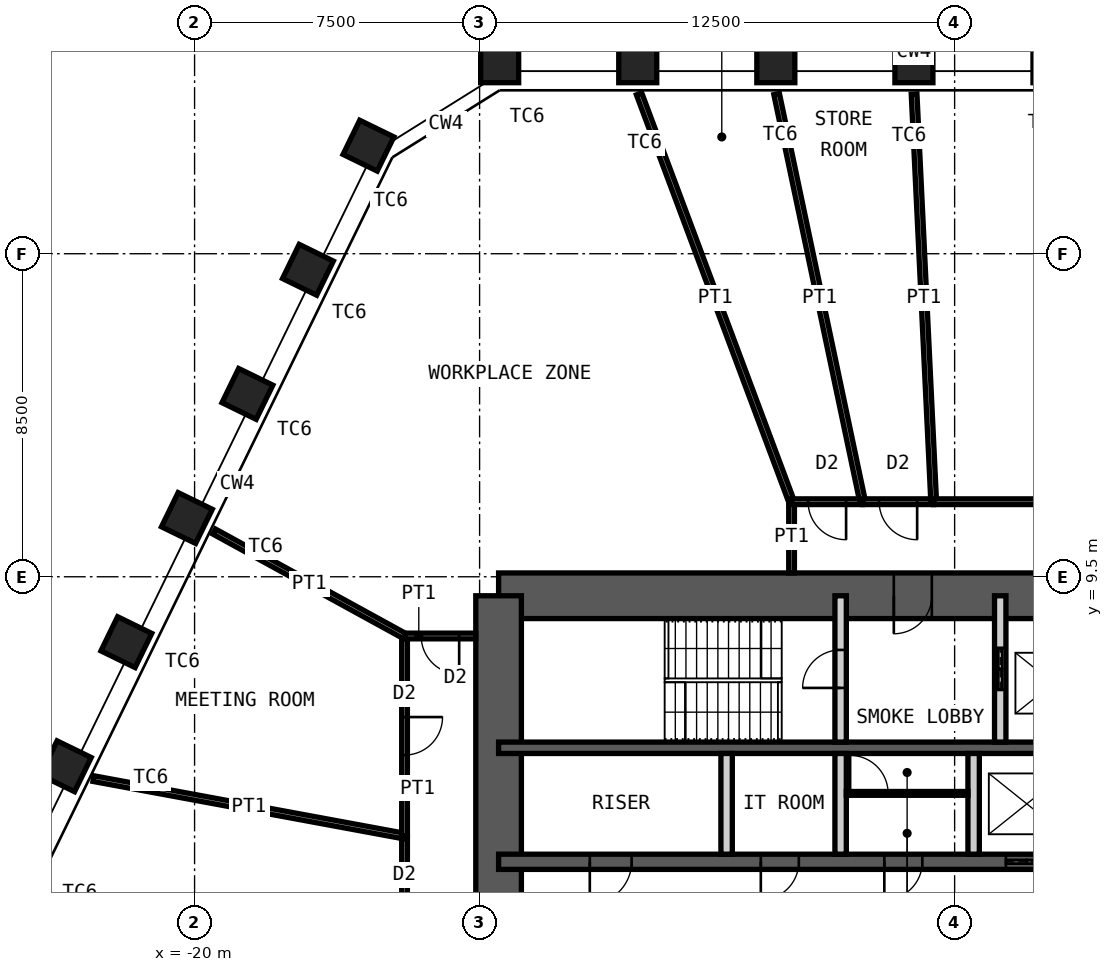
"""IFC4 building model, lengths in metres.
Left out: names, types, materials, properties, quantities, classifications, styles, units other than length and angle.
Written with IfcOpenShell. Run it as: python <this file> out.ifc"""

import sys

from ifc_helpers import new_model, si_unit, direction, frame, frame_2d, origin, origin_2d, place, context, subcontext, project, spatial, rectangle, hollow_rectangle, extrude, element, fill, save


model = new_model("IFC4")
c1 = context("Model", 3, precision=1e-05, world=origin(), true_north=direction((0.0, 1.0)))
c2 = subcontext(c1, "Body", "Model", "MODEL_VIEW")
j1 = project(units=[si_unit("LENGTHUNIT", "METRE"), si_unit("PLANEANGLEUNIT", "RADIAN")], contexts=[c1])
p1 = place(None, origin())
s1 = spatial("IfcSite", under=j1, at=p1, CompositionType="ELEMENT")
p2 = place(p1, origin())
s2 = spatial("IfcBuilding", under=s1, at=p2, CompositionType="ELEMENT")
p3 = place(p2, frame((0.0, 0.0, 243.4)))
s3 = spatial("IfcBuildingStorey", under=s2, at=p3, CompositionType="ELEMENT", Elevation=243.4)
for number, where, z_axis, x_axis in (
    (1, (-11.972, 23.0, 0.0), (0.0, 0.0, 1.0), (-1.0, 0.0, 0.0)),
    (2, (-8.338, 23.0, 0.0), (0.0, 0.0, 1.0), (-1.0, 0.0, 0.0)),
    (3, (-4.705, 23.0, 0.0), (0.0, 0.0, 1.0), (-1.0, 0.0, 0.0)),
    (4, (-1.071, 23.0, 0.0), (0.0, 0.0, 1.0), (-1.0, 0.0, 0.0)),
    (5, (-23.388, 4.514, 0.0), (0.0, 0.0, 1.0), (-0.438, -0.899, 0.0)),
    (6, (-21.795, 7.78, 0.0), (0.0, 0.0, 1.0), (-0.438, -0.899, 0.0)),
    (7, (-20.203, 11.045, 0.0), (0.0, 0.0, 1.0), (-0.438, -0.899, 0.0)),
    (8, (-18.61, 14.311, 0.0), (0.0, 0.0, 1.0), (-0.438, -0.899, 0.0)),
    (9, (-17.017, 17.577, 0.0), (0.0, 0.0, 1.0), (-0.438, -0.899, 0.0)),
    (10, (-15.424, 20.843, 0.0), (0.0, 0.0, 1.0), (-0.438, -0.899, 0.0)),
):
    element("IfcColumn", number, at=place(p3, frame(where, z_axis=z_axis, x_axis=x_axis)), inside=s3, PredefinedType="COLUMN", context=c2, shape_type="SweptSolid", body=[
        extrude(hollow_rectangle(XDim=1.0, YDim=1.0, WallThickness=0.06, at=origin_2d()), origin(), (0.0, 0.0, 1.0), 4.2),
    ])
p4 = place(p3, frame((-12.0, 9.0, 0.0), z_axis=(0.0, 0.0, 1.0), x_axis=(1.0, 0.0, 0.0)))
e11 = element("IfcWall", 11, at=p4, inside=s3, PredefinedType="SHEAR", context=c2, shape_type="SweptSolid", body=[
    extrude(rectangle(XDim=24.0, YDim=1.2, at=frame_2d((12.0, 0.0))), origin(), (0.0, 0.0, 1.0), 4.2),
])
p5 = place(p4, frame((10.4, 0.0, 0.0)))
e12 = element("IfcOpeningElement", 12, at=p5, cuts=e11, PredefinedType="OPENING", context=c2, shape_type="SweptSolid", body=[
    extrude(rectangle(XDim=1.0, YDim=2.1, at=frame_2d((0.5, 1.05))), frame((0.0, 0.61, 0.0), z_axis=(0.0, -1.0, 0.0), x_axis=(1.0, 0.0, 0.0)), (0.0, 0.0, 1.0), 1.22),
])
p6 = place(p4, frame((17.6, 0.0, 0.0)))
e13 = element("IfcOpeningElement", 13, at=p6, cuts=e11, PredefinedType="OPENING", context=c2, shape_type="SweptSolid", body=[
    extrude(rectangle(XDim=0.9, YDim=2.1, at=frame_2d((0.45, 1.05))), frame((0.0, 0.61, 0.0), z_axis=(0.0, -1.0, 0.0), x_axis=(1.0, 0.0, 0.0)), (0.0, 0.0, 1.0), 1.22),
])
p7 = place(p4, frame((21.9, 0.0, 0.0)))
e14 = element("IfcOpeningElement", 14, at=p7, cuts=e11, PredefinedType="OPENING", context=c2, shape_type="SweptSolid", body=[
    extrude(rectangle(XDim=0.9, YDim=2.1, at=frame_2d((0.45, 1.05))), frame((0.0, 0.61, 0.0), z_axis=(0.0, -1.0, 0.0), x_axis=(1.0, 0.0, 0.0)), (0.0, 0.0, 1.0), 1.22),
])
p8 = place(p3, frame((-12.0, -9.0, 0.0), z_axis=(0.0, 0.0, 1.0), x_axis=(0.0, 1.0, 0.0)))
e15 = element("IfcWall", 15, at=p8, inside=s3, PredefinedType="SHEAR", context=c2, shape_type="SweptSolid", body=[
    extrude(rectangle(XDim=18.0, YDim=1.2, at=frame_2d((9.0, 0.0))), origin(), (0.0, 0.0, 1.0), 4.2),
])
p9 = place(p8, frame((8.1, 0.0, 0.0)))
e16 = element("IfcOpeningElement", 16, at=p9, cuts=e15, PredefinedType="OPENING", context=c2, shape_type="SweptSolid", body=[
    extrude(rectangle(XDim=1.8, YDim=2.1, at=frame_2d((0.9, 1.05))), frame((0.0, 0.61, 0.0), z_axis=(0.0, -1.0, 0.0), x_axis=(1.0, 0.0, 0.0)), (0.0, 0.0, 1.0), 1.22),
])
p10 = place(p3, frame((-12.0, 5.0, 0.0), z_axis=(0.0, 0.0, 1.0), x_axis=(1.0, 0.0, 0.0)))
e17 = element("IfcWall", 17, at=p10, inside=s3, PredefinedType="SHEAR", context=c2, shape_type="SweptSolid", body=[
    extrude(rectangle(XDim=24.0, YDim=0.3, at=frame_2d((12.0, 0.0))), origin(), (0.0, 0.0, 1.0), 4.2),
])
p11 = place(p3, frame((-12.0, 2.0, 0.0), z_axis=(0.0, 0.0, 1.0), x_axis=(1.0, 0.0, 0.0)))
e18 = element("IfcWall", 18, at=p11, inside=s3, PredefinedType="SHEAR", context=c2, shape_type="SweptSolid", body=[
    extrude(rectangle(XDim=24.0, YDim=0.4, at=frame_2d((12.0, 0.0))), origin(), (0.0, 0.0, 1.0), 4.2),
])
p12 = place(p11, frame((2.4, 0.0, 0.0)))
e19 = element("IfcOpeningElement", 19, at=p12, cuts=e18, PredefinedType="OPENING", context=c2, shape_type="SweptSolid", body=[
    extrude(rectangle(XDim=1.1, YDim=2.1, at=frame_2d((0.55, 1.05))), frame((0.0, 0.21, 0.0), z_axis=(0.0, -1.0, 0.0), x_axis=(1.0, 0.0, 0.0)), (0.0, 0.0, 1.0), 0.42),
])
p13 = place(p11, frame((22.0, 0.0, 0.0)))
e20 = element("IfcOpeningElement", 20, at=p13, cuts=e18, PredefinedType="OPENING", context=c2, shape_type="SweptSolid", body=[
    extrude(rectangle(XDim=1.1, YDim=2.1, at=frame_2d((0.55, 1.05))), frame((0.0, 0.21, 0.0), z_axis=(0.0, -1.0, 0.0), x_axis=(1.0, 0.0, 0.0)), (0.0, 0.0, 1.0), 0.42),
])
p14 = place(p11, frame((10.15, 0.0, 0.0)))
e21 = element("IfcOpeningElement", 21, at=p14, cuts=e18, PredefinedType="OPENING", context=c2, shape_type="SweptSolid", body=[
    extrude(rectangle(XDim=1.0, YDim=2.1, at=frame_2d((0.5, 1.05))), frame((0.0, 0.21, 0.0), z_axis=(0.0, -1.0, 0.0), x_axis=(1.0, 0.0, 0.0)), (0.0, 0.0, 1.0), 0.42),
])
p15 = place(p11, frame((6.9, 0.0, 0.0)))
e22 = element("IfcOpeningElement", 22, at=p15, cuts=e18, PredefinedType="OPENING", context=c2, shape_type="SweptSolid", body=[
    extrude(rectangle(XDim=1.0, YDim=2.1, at=frame_2d((0.5, 1.05))), frame((0.0, 0.21, 0.0), z_axis=(0.0, -1.0, 0.0), x_axis=(1.0, 0.0, 0.0)), (0.0, 0.0, 1.0), 0.42),
])
p16 = place(p11, frame((13.35, 0.0, 0.0)))
e23 = element("IfcOpeningElement", 23, at=p16, cuts=e18, PredefinedType="OPENING", context=c2, shape_type="SweptSolid", body=[
    extrude(rectangle(XDim=1.1, YDim=2.4, at=frame_2d((0.55, 1.2))), frame((0.0, 0.21, 0.0), z_axis=(0.0, -1.0, 0.0), x_axis=(1.0, 0.0, 0.0)), (0.0, 0.0, 1.0), 0.42),
])
p17 = place(p11, frame((16.15, 0.0, 0.0)))
e24 = element("IfcOpeningElement", 24, at=p17, cuts=e18, PredefinedType="OPENING", context=c2, shape_type="SweptSolid", body=[
    extrude(rectangle(XDim=1.1, YDim=2.4, at=frame_2d((0.55, 1.2))), frame((0.0, 0.21, 0.0), z_axis=(0.0, -1.0, 0.0), x_axis=(1.0, 0.0, 0.0)), (0.0, 0.0, 1.0), 0.42),
])
p18 = place(p11, frame((18.95, 0.0, 0.0)))
e25 = element("IfcOpeningElement", 25, at=p18, cuts=e18, PredefinedType="OPENING", context=c2, shape_type="SweptSolid", body=[
    extrude(rectangle(XDim=1.1, YDim=2.4, at=frame_2d((0.55, 1.2))), frame((0.0, 0.21, 0.0), z_axis=(0.0, -1.0, 0.0), x_axis=(1.0, 0.0, 0.0)), (0.0, 0.0, 1.0), 0.42),
])
p19 = place(p3, frame((-3.0, 5.15, 0.0), z_axis=(0.0, 0.0, 1.0), x_axis=(0.0, 1.0, 0.0)))
e26 = element("IfcWall", 26, at=p19, inside=s3, PredefinedType="PARTITIONING", context=c2, shape_type="SweptSolid", body=[
    extrude(rectangle(XDim=3.85, YDim=0.3, at=frame_2d((1.925, 0.0))), origin(), (0.0, 0.0, 1.0), 3.98),
])
p20 = place(p19, frame((1.425, 0.0, 0.0)))
e27 = element("IfcOpeningElement", 27, at=p20, cuts=e26, PredefinedType="OPENING", context=c2, shape_type="SweptSolid", body=[
    extrude(rectangle(XDim=1.0, YDim=2.1, at=frame_2d((0.5, 1.05))), frame((0.0, 0.16, 0.0), z_axis=(0.0, -1.0, 0.0), x_axis=(1.0, 0.0, 0.0)), (0.0, 0.0, 1.0), 0.32),
])
p21 = place(p3, frame((1.2, 5.15, 0.0), z_axis=(0.0, 0.0, 1.0), x_axis=(0.0, 1.0, 0.0)))
e28 = element("IfcWall", 28, at=p21, inside=s3, PredefinedType="PARTITIONING", context=c2, shape_type="SweptSolid", body=[
    extrude(rectangle(XDim=3.85, YDim=0.3, at=frame_2d((1.925, 0.0))), origin(), (0.0, 0.0, 1.0), 3.98),
])
p22 = place(p21, frame((1.375, 0.0, 0.0)))
e29 = element("IfcOpeningElement", 29, at=p22, cuts=e28, PredefinedType="OPENING", context=c2, shape_type="SweptSolid", body=[
    extrude(rectangle(XDim=1.1, YDim=2.4, at=frame_2d((0.55, 1.2))), frame((0.0, 0.16, 0.0), z_axis=(0.0, -1.0, 0.0), x_axis=(1.0, 0.0, 0.0)), (0.0, 0.0, 1.0), 0.32),
])
for number, where, z_axis, x_axis in (
    (30, (-6.0, 2.2, 0.0), (0.0, 0.0, 1.0), (0.0, 1.0, 0.0)),
    (31, (-3.0, 2.2, 0.0), (0.0, 0.0, 1.0), (0.0, 1.0, 0.0)),
    (32, (0.5, 2.2, 0.0), (0.0, 0.0, 1.0), (0.0, 1.0, 0.0)),
):
    element("IfcWall", number, at=place(p3, frame(where, z_axis=z_axis, x_axis=x_axis)), inside=s3, PredefinedType="PARTITIONING", context=c2, shape_type="SweptSolid", body=[
        extrude(rectangle(XDim=2.65, YDim=0.3, at=frame_2d((1.325, 0.0))), origin(), (0.0, 0.0, 1.0), 3.98),
    ])
p23 = place(p3, frame((-2.85, 3.8, 0.0), z_axis=(0.0, 0.0, 1.0), x_axis=(1.0, 0.0, 0.0)))
e33 = element("IfcWall", 33, at=p23, inside=s3, PredefinedType="PARTITIONING", context=c2, shape_type="SweptSolid", body=[
    extrude(rectangle(XDim=3.2, YDim=0.1, at=frame_2d((1.6, 0.0))), origin(), (0.0, 0.0, 1.0), 3.98),
])
p24 = place(p23, frame((0.1, 0.0, 0.0)))
e34 = element("IfcOpeningElement", 34, at=p24, cuts=e33, PredefinedType="OPENING", context=c2, shape_type="SweptSolid", body=[
    extrude(rectangle(XDim=1.0, YDim=2.4, at=frame_2d((0.5, 1.2))), frame((0.0, 0.06, 0.0), z_axis=(0.0, -1.0, 0.0), x_axis=(1.0, 0.0, 0.0)), (0.0, 0.0, 1.0), 0.12),
])
p25 = place(p3, frame((-14.475, -1.576, 0.0), z_axis=(0.0, 0.0, 1.0), x_axis=(0.0, 1.0, 0.0)))
e35 = element("IfcWall", 35, at=p25, inside=s3, PredefinedType="PARTITIONING", context=c2, shape_type="SweptSolid", body=[
    extrude(rectangle(XDim=4.252, YDim=0.15, at=frame_2d((2.126, 0.0))), origin(), (0.0, 0.0, 1.0), 4.03),
])
p26 = place(p25, frame((1.626, 0.0, 0.0)))
e36 = element("IfcOpeningElement", 36, at=p26, cuts=e35, PredefinedType="OPENING", context=c2, shape_type="SweptSolid", body=[
    extrude(rectangle(XDim=1.0, YDim=2.4, at=frame_2d((0.5, 1.2))), frame((0.0, 0.085, 0.0), z_axis=(0.0, -1.0, 0.0), x_axis=(1.0, 0.0, 0.0)), (0.0, 0.0, 1.0), 0.17),
])
p27 = place(p3, frame((-22.661, 4.189, 0.0), z_axis=(0.0, 0.0, 1.0), x_axis=(0.983345347199, -0.181746879316, 0.0)))
e37 = element("IfcWall", 37, at=p27, inside=s3, PredefinedType="PARTITIONING", context=c2, shape_type="SweptSolid", body=[
    extrude(rectangle(XDim=8.324, YDim=0.15, at=frame_2d((4.162, 0.0))), origin(), (0.0, 0.0, 1.0), 3.43),
])
p28 = place(p3, frame((-14.475, 2.676, 0.0), z_axis=(0.0, 0.0, 1.0), x_axis=(0.0, 1.0, 0.0)))
e38 = element("IfcWall", 38, at=p28, inside=s3, PredefinedType="PARTITIONING", context=c2, shape_type="SweptSolid", body=[
    extrude(rectangle(XDim=5.266, YDim=0.15, at=frame_2d((2.633, 0.0))), origin(), (0.0, 0.0, 1.0), 4.03),
])
p29 = place(p28, frame((2.133, 0.0, 0.0)))
e39 = element("IfcOpeningElement", 39, at=p29, cuts=e38, PredefinedType="OPENING", context=c2, shape_type="SweptSolid", body=[
    extrude(rectangle(XDim=1.0, YDim=2.4, at=frame_2d((0.5, 1.2))), frame((0.0, 0.085, 0.0), z_axis=(0.0, -1.0, 0.0), x_axis=(1.0, 0.0, 0.0)), (0.0, 0.0, 1.0), 0.17),
])
p30 = place(p3, frame((-19.486, 10.69, 0.0), z_axis=(0.0, 0.0, 1.0), x_axis=(0.876724089264, -0.480993629172, 0.0)))
e40 = element("IfcWall", 40, at=p30, inside=s3, PredefinedType="PARTITIONING", context=c2, shape_type="SweptSolid", body=[
    extrude(rectangle(XDim=5.715, YDim=0.15, at=frame_2d((2.858, 0.0))), origin(), (0.0, 0.0, 1.0), 3.43),
])
p31 = place(p3, frame((-14.475, 7.941, 0.0), z_axis=(0.0, 0.0, 1.0), x_axis=(1.0, 0.0, 0.0)))
e41 = element("IfcWall", 41, at=p31, inside=s3, PredefinedType="PARTITIONING", context=c2, shape_type="SweptSolid", body=[
    extrude(rectangle(XDim=1.875, YDim=0.15, at=frame_2d((0.938, 0.0))), origin(), (0.0, 0.0, 1.0), 4.03),
])
p32 = place(p31, frame((0.438, 0.0, 0.0)))
e42 = element("IfcOpeningElement", 42, at=p32, cuts=e41, PredefinedType="OPENING", context=c2, shape_type="SweptSolid", body=[
    extrude(rectangle(XDim=1.0, YDim=2.4, at=frame_2d((0.5, 1.2))), frame((0.0, 0.085, 0.0), z_axis=(0.0, -1.0, 0.0), x_axis=(1.0, 0.0, 0.0)), (0.0, 0.0, 1.0), 0.17),
])
p33 = place(p3, frame((-4.291, 9.6, 0.0), z_axis=(0.0, 0.0, 1.0), x_axis=(0.0, 1.0, 0.0)))
e43 = element("IfcWall", 43, at=p33, inside=s3, PredefinedType="PARTITIONING", context=c2, shape_type="SweptSolid", body=[
    extrude(rectangle(XDim=1.875, YDim=0.15, at=frame_2d((0.938, 0.0))), origin(), (0.0, 0.0, 1.0), 4.03),
])
p34 = place(p3, frame((-8.303, 22.206, 0.0), z_axis=(0.0, 0.0, 1.0), x_axis=(0.350242883069, -0.936658914899, 0.0)))
e44 = element("IfcWall", 44, at=p34, inside=s3, PredefinedType="PARTITIONING", context=c2, shape_type="SweptSolid", body=[
    extrude(rectangle(XDim=11.457, YDim=0.15, at=frame_2d((5.729, 0.0))), origin(), (0.0, 0.0, 1.0), 3.43),
])
p35 = place(p3, frame((-4.291, 11.475, 0.0), z_axis=(0.0, 0.0, 1.0), x_axis=(1.0, 0.0, 0.0)))
e45 = element("IfcWall", 45, at=p35, inside=s3, PredefinedType="PARTITIONING", context=c2, shape_type="SweptSolid", body=[
    extrude(rectangle(XDim=1.87, YDim=0.15, at=frame_2d((0.935, 0.0))), origin(), (0.0, 0.0, 1.0), 4.03),
])
p36 = place(p35, frame((0.435, 0.0, 0.0)))
e46 = element("IfcOpeningElement", 46, at=p36, cuts=e45, PredefinedType="OPENING", context=c2, shape_type="SweptSolid", body=[
    extrude(rectangle(XDim=1.0, YDim=2.4, at=frame_2d((0.5, 1.2))), frame((0.0, 0.085, 0.0), z_axis=(0.0, -1.0, 0.0), x_axis=(1.0, 0.0, 0.0)), (0.0, 0.0, 1.0), 0.17),
])
p37 = place(p3, frame((-4.684, 22.202, 0.0), z_axis=(0.0, 0.0, 1.0), x_axis=(0.206456017157, -0.978455881979, 0.0)))
e47 = element("IfcWall", 47, at=p37, inside=s3, PredefinedType="PARTITIONING", context=c2, shape_type="SweptSolid", body=[
    extrude(rectangle(XDim=10.963, YDim=0.15, at=frame_2d((5.481, 0.0))), origin(), (0.0, 0.0, 1.0), 3.43),
])
p38 = place(p3, frame((-2.421, 11.475, 0.0), z_axis=(0.0, 0.0, 1.0), x_axis=(1.0, 0.0, 0.0)))
e48 = element("IfcWall", 48, at=p38, inside=s3, PredefinedType="PARTITIONING", context=c2, shape_type="SweptSolid", body=[
    extrude(rectangle(XDim=1.87, YDim=0.15, at=frame_2d((0.935, 0.0))), origin(), (0.0, 0.0, 1.0), 4.03),
])
p39 = place(p38, frame((0.435, 0.0, 0.0)))
e49 = element("IfcOpeningElement", 49, at=p39, cuts=e48, PredefinedType="OPENING", context=c2, shape_type="SweptSolid", body=[
    extrude(rectangle(XDim=1.0, YDim=2.4, at=frame_2d((0.5, 1.2))), frame((0.0, 0.085, 0.0), z_axis=(0.0, -1.0, 0.0), x_axis=(1.0, 0.0, 0.0)), (0.0, 0.0, 1.0), 0.17),
])
p40 = place(p3, frame((-1.067, 22.2, 0.0), z_axis=(0.0, 0.0, 1.0), x_axis=(0.047998335863, -0.998847415652, 0.0)))
e50 = element("IfcWall", 50, at=p40, inside=s3, PredefinedType="PARTITIONING", context=c2, shape_type="SweptSolid", body=[
    extrude(rectangle(XDim=10.738, YDim=0.15, at=frame_2d((5.369, 0.0))), origin(), (0.0, 0.0, 1.0), 3.43),
])
p41 = place(p3, frame((-0.551, 11.475, 0.0), z_axis=(0.0, 0.0, 1.0), x_axis=(1.0, 0.0, 0.0)))
e51 = element("IfcWall", 51, at=p41, inside=s3, PredefinedType="PARTITIONING", context=c2, shape_type="SweptSolid", body=[
    extrude(rectangle(XDim=10.342, YDim=0.15, at=frame_2d((5.171, 0.0))), origin(), (0.0, 0.0, 1.0), 4.03),
])
p42 = place(p41, frame((4.271, 0.0, 0.0)))
e52 = element("IfcOpeningElement", 52, at=p42, cuts=e51, PredefinedType="OPENING", context=c2, shape_type="SweptSolid", body=[
    extrude(rectangle(XDim=1.8, YDim=2.4, at=frame_2d((0.9, 1.2))), frame((0.0, 0.085, 0.0), z_axis=(0.0, -1.0, 0.0), x_axis=(1.0, 0.0, 0.0)), (0.0, 0.0, 1.0), 0.17),
])
p43 = place(p5, origin())
e53 = element("IfcDoor", 53, at=p43, inside=s3, OperationType="SINGLE_SWING_LEFT", PredefinedType="DOOR", context=c2, shape_type="SweptSolid", body=[
    extrude(rectangle(XDim=1.0, YDim=2.1, at=frame_2d((0.5, 1.05))), frame((0.0, 0.025, 0.0), z_axis=(0.0, -1.0, 0.0), x_axis=(1.0, 0.0, 0.0)), (0.0, 0.0, 1.0), 0.05),
])
fill(e12, e53)
p44 = place(p20, origin())
e54 = element("IfcDoor", 54, at=p44, inside=s3, OperationType="SINGLE_SWING_RIGHT", PredefinedType="DOOR", context=c2, shape_type="SweptSolid", body=[
    extrude(rectangle(XDim=1.0, YDim=2.1, at=frame_2d((0.5, 1.05))), frame((0.0, 0.025, 0.0), z_axis=(0.0, -1.0, 0.0), x_axis=(1.0, 0.0, 0.0)), (0.0, 0.0, 1.0), 0.05),
])
fill(e27, e54)
p45 = place(p12, origin())
e55 = element("IfcDoor", 55, at=p45, inside=s3, OperationType="SINGLE_SWING_LEFT", PredefinedType="DOOR", context=c2, shape_type="SweptSolid", body=[
    extrude(rectangle(XDim=1.1, YDim=2.1, at=frame_2d((0.55, 1.05))), frame((0.0, 0.025, 0.0), z_axis=(0.0, -1.0, 0.0), x_axis=(1.0, 0.0, 0.0)), (0.0, 0.0, 1.0), 0.05),
])
fill(e19, e55)
p46 = place(p14, origin())
e56 = element("IfcDoor", 56, at=p46, inside=s3, OperationType="SINGLE_SWING_LEFT", PredefinedType="DOOR", context=c2, shape_type="SweptSolid", body=[
    extrude(rectangle(XDim=1.0, YDim=2.1, at=frame_2d((0.5, 1.05))), frame((0.0, 0.025, 0.0), z_axis=(0.0, -1.0, 0.0), x_axis=(1.0, 0.0, 0.0)), (0.0, 0.0, 1.0), 0.05),
])
fill(e21, e56)
p47 = place(p22, origin())
e57 = element("IfcDoor", 57, at=p47, inside=s3, OperationType="DOUBLE_DOOR_SLIDING", PredefinedType="DOOR", context=c2, shape_type="SweptSolid", body=[
    extrude(rectangle(XDim=1.1, YDim=2.4, at=frame_2d((0.55, 1.2))), frame((0.0, 0.025, 0.0), z_axis=(0.0, -1.0, 0.0), x_axis=(1.0, 0.0, 0.0)), (0.0, 0.0, 1.0), 0.05),
])
fill(e29, e57)
p48 = place(p15, origin())
e58 = element("IfcDoor", 58, at=p48, inside=s3, OperationType="SINGLE_SWING_LEFT", PredefinedType="DOOR", context=c2, shape_type="SweptSolid", body=[
    extrude(rectangle(XDim=1.0, YDim=2.1, at=frame_2d((0.5, 1.05))), frame((0.0, 0.025, 0.0), z_axis=(0.0, -1.0, 0.0), x_axis=(1.0, 0.0, 0.0)), (0.0, 0.0, 1.0), 0.05),
])
fill(e22, e58)
p49 = place(p16, origin())
e59 = element("IfcDoor", 59, at=p49, inside=s3, OperationType="DOUBLE_DOOR_SLIDING", PredefinedType="DOOR", context=c2, shape_type="SweptSolid", body=[
    extrude(rectangle(XDim=1.1, YDim=2.4, at=frame_2d((0.55, 1.2))), frame((0.0, 0.025, 0.0), z_axis=(0.0, -1.0, 0.0), x_axis=(1.0, 0.0, 0.0)), (0.0, 0.0, 1.0), 0.05),
])
fill(e23, e59)
p50 = place(p24, origin())
e60 = element("IfcDoor", 60, at=p50, inside=s3, OperationType="SINGLE_SWING_RIGHT", PredefinedType="DOOR", context=c2, shape_type="SweptSolid", body=[
    extrude(rectangle(XDim=1.0, YDim=2.4, at=frame_2d((0.5, 1.2))), frame((0.0, 0.025, 0.0), z_axis=(0.0, -1.0, 0.0), x_axis=(1.0, 0.0, 0.0)), (0.0, 0.0, 1.0), 0.05),
])
fill(e34, e60)
p51 = place(p29, origin())
e61 = element("IfcDoor", 61, at=p51, inside=s3, OperationType="SINGLE_SWING_RIGHT", PredefinedType="DOOR", context=c2, shape_type="SweptSolid", body=[
    extrude(rectangle(XDim=1.0, YDim=2.4, at=frame_2d((0.5, 1.2))), frame((0.0, 0.025, 0.0), z_axis=(0.0, -1.0, 0.0), x_axis=(1.0, 0.0, 0.0)), (0.0, 0.0, 1.0), 0.05),
])
fill(e39, e61)
p52 = place(p32, origin())
e62 = element("IfcDoor", 62, at=p52, inside=s3, OperationType="SINGLE_SWING_RIGHT", PredefinedType="DOOR", context=c2, shape_type="SweptSolid", body=[
    extrude(rectangle(XDim=1.0, YDim=2.4, at=frame_2d((0.5, 1.2))), frame((0.0, 0.025, 0.0), z_axis=(0.0, -1.0, 0.0), x_axis=(1.0, 0.0, 0.0)), (0.0, 0.0, 1.0), 0.05),
])
fill(e42, e62)
p53 = place(p36, origin())
e63 = element("IfcDoor", 63, at=p53, inside=s3, OperationType="SINGLE_SWING_RIGHT", PredefinedType="DOOR", context=c2, shape_type="SweptSolid", body=[
    extrude(rectangle(XDim=1.0, YDim=2.4, at=frame_2d((0.5, 1.2))), frame((0.0, 0.025, 0.0), z_axis=(0.0, -1.0, 0.0), x_axis=(1.0, 0.0, 0.0)), (0.0, 0.0, 1.0), 0.05),
])
fill(e46, e63)
p54 = place(p39, origin())
e64 = element("IfcDoor", 64, at=p54, inside=s3, OperationType="SINGLE_SWING_RIGHT", PredefinedType="DOOR", context=c2, shape_type="SweptSolid", body=[
    extrude(rectangle(XDim=1.0, YDim=2.4, at=frame_2d((0.5, 1.2))), frame((0.0, 0.025, 0.0), z_axis=(0.0, -1.0, 0.0), x_axis=(1.0, 0.0, 0.0)), (0.0, 0.0, 1.0), 0.05),
])
fill(e49, e64)
save(model, sys.argv[1])
